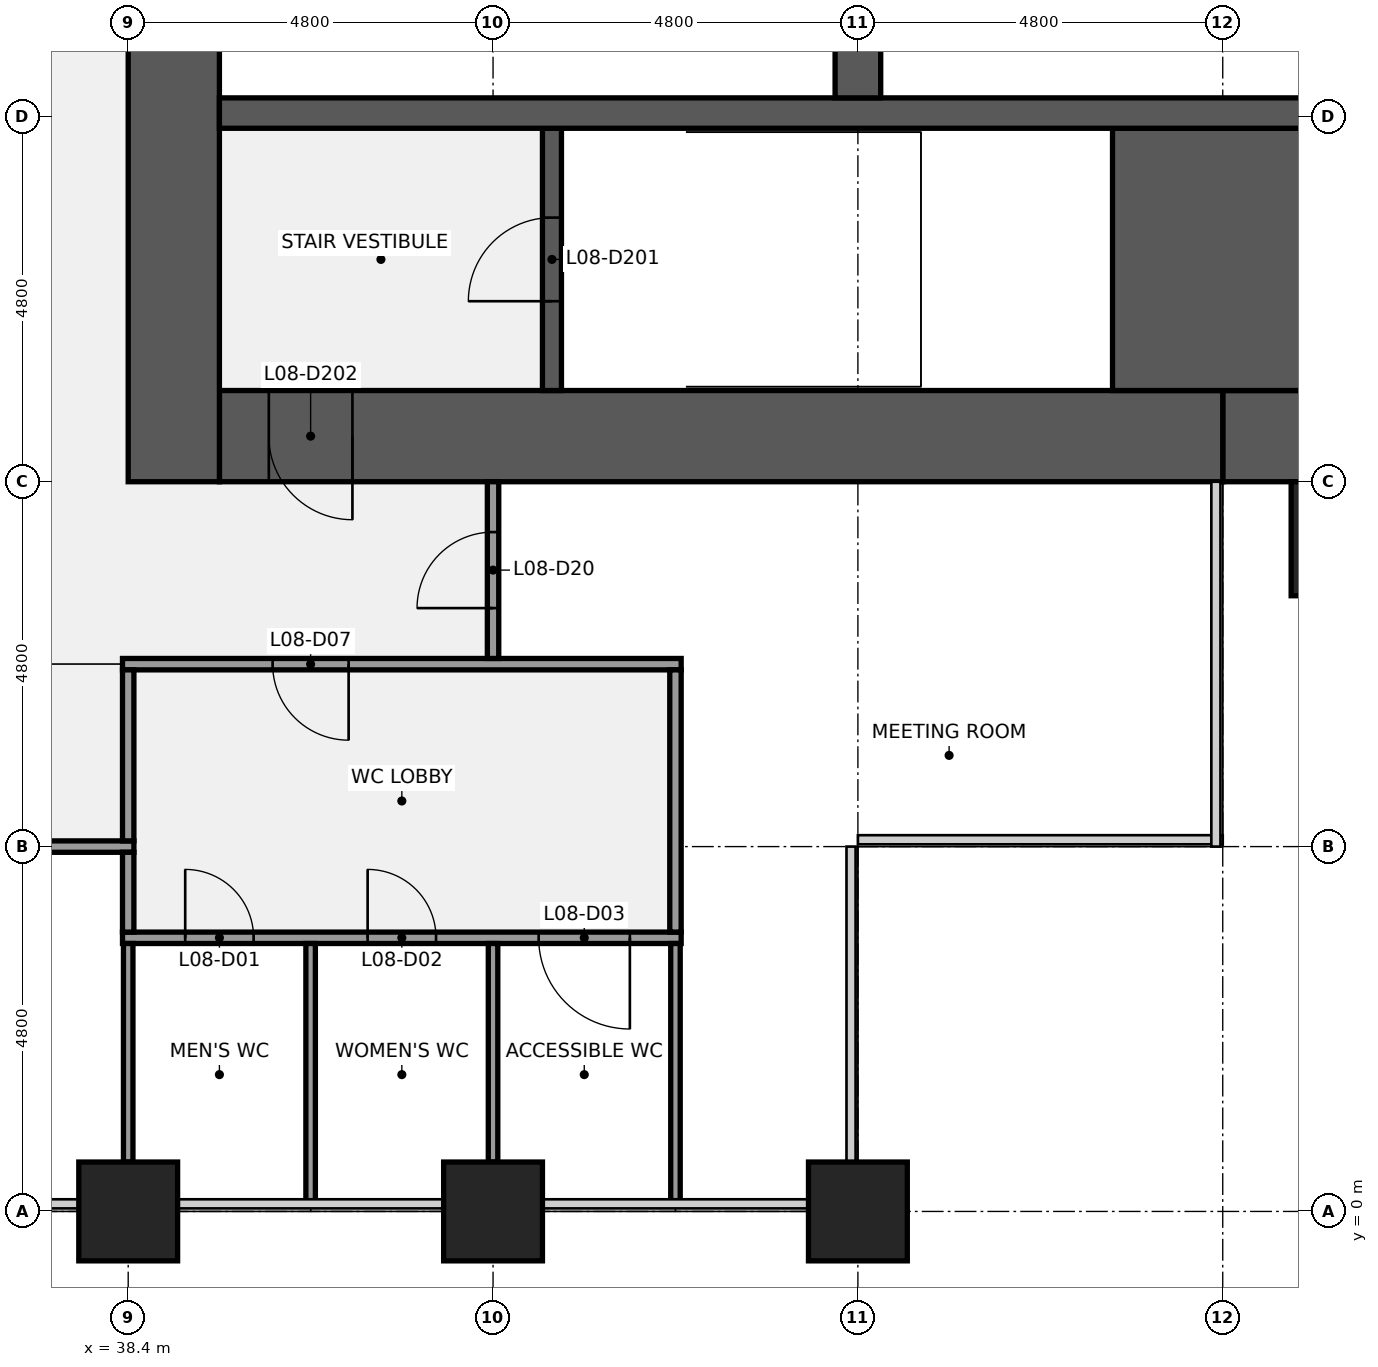
"""IFC4 building model, lengths in metres.
Left out: names, types, materials, properties, quantities, classifications, styles, units other than length and angle.
Written with IfcOpenShell. Run it as: python <this file> out.ifc"""

import sys

from ifc_helpers import new_model, si_unit, direction, frame, frame_2d, origin, origin_2d, place, context, subcontext, project, spatial, rectangle, extrude, element, fill, save


model = new_model("IFC4")
c1 = context("Model", 3, precision=1e-05, world=origin(), true_north=direction((0.0, 1.0)))
c2 = subcontext(c1, "Body", "Model", "MODEL_VIEW")
j1 = project(units=[si_unit("LENGTHUNIT", "METRE"), si_unit("PLANEANGLEUNIT", "RADIAN")], contexts=[c1])
p1 = place(None, origin())
s1 = spatial("IfcSite", under=j1, at=p1, CompositionType="ELEMENT")
p2 = place(p1, origin())
s2 = spatial("IfcBuilding", under=s1, at=p2, CompositionType="ELEMENT")
p3 = place(p2, frame((0.0, 0.0, 43.0)))
s3 = spatial("IfcBuildingStorey", under=s2, at=p3, CompositionType="ELEMENT", Elevation=43.0)
for number, where, z_axis, x_axis in (
    (1, (38.4, 0.0, 0.0), (0.0, 0.0, 1.0), (1.0, 0.0, 0.0)),
    (2, (43.2, 0.0, 0.0), (0.0, 0.0, 1.0), (1.0, 0.0, 0.0)),
    (3, (48.0, 0.0, 0.0), (0.0, 0.0, 1.0), (1.0, 0.0, 0.0)),
):
    element("IfcColumn", number, at=place(p3, frame(where, z_axis=z_axis, x_axis=x_axis)), inside=s3, PredefinedType="COLUMN", context=c2, shape_type="SweptSolid", body=[
        extrude(rectangle(XDim=1.3, YDim=1.3, at=origin_2d()), origin(), (0.0, 0.0, 1.0), 4.0),
    ])
p4 = place(p3, frame((56.4, 10.2, 0.0), z_axis=(0.0, 0.0, 1.0), x_axis=(-1.0, 0.0, 0.0)))
e4 = element("IfcWall", 4, at=p4, inside=s3, PredefinedType="SHEAR", context=c2, shape_type="SweptSolid", body=[
    extrude(rectangle(XDim=3.6, YDim=1.2, at=frame_2d((1.8, 0.0))), origin(), (0.0, 0.0, 1.0), 3.84),
])
p5 = place(p3, frame((52.8, 10.2, 0.0), z_axis=(0.0, 0.0, 1.0), x_axis=(-1.0, 0.0, 0.0)))
e5 = element("IfcWall", 5, at=p5, inside=s3, PredefinedType="SHEAR", context=c2, shape_type="SweptSolid", body=[
    extrude(rectangle(XDim=13.2, YDim=1.2, at=frame_2d((6.6, 0.0))), origin(), (0.0, 0.0, 1.0), 3.84),
])
p6 = place(p5, frame((11.45, 0.0, 0.0)))
e6 = element("IfcOpeningElement", 6, at=p6, cuts=e5, PredefinedType="OPENING", context=c2, shape_type="SweptSolid", body=[
    extrude(rectangle(XDim=1.1, YDim=2.1, at=frame_2d((0.55, 1.05))), frame((0.0, 0.61, 0.0), z_axis=(0.0, -1.0, 0.0), x_axis=(1.0, 0.0, 0.0)), (0.0, 0.0, 1.0), 1.22),
])
p7 = place(p3, frame((39.0, 9.6, 0.0), z_axis=(0.0, 0.0, 1.0), x_axis=(0.0, 1.0, 0.0)))
e7 = element("IfcWall", 7, at=p7, inside=s3, PredefinedType="SHEAR", context=c2, shape_type="SweptSolid", body=[
    extrude(rectangle(XDim=28.8, YDim=1.2, at=frame_2d((14.4, 0.0))), origin(), (0.0, 0.0, 1.0), 3.84),
])
p8 = place(p7, frame((8.7, 0.0, 0.0)))
e8 = element("IfcOpeningElement", 8, at=p8, cuts=e7, PredefinedType="OPENING", context=c2, shape_type="SweptSolid", body=[
    extrude(rectangle(XDim=1.8, YDim=2.1, at=frame_2d((0.9, 1.05))), frame((0.0, 0.61, 0.0), z_axis=(0.0, -1.0, 0.0), x_axis=(1.0, 0.0, 0.0)), (0.0, 0.0, 1.0), 1.22),
])
p9 = place(p7, frame((18.3, 0.0, 0.0)))
e9 = element("IfcOpeningElement", 9, at=p9, cuts=e7, PredefinedType="OPENING", context=c2, shape_type="SweptSolid", body=[
    extrude(rectangle(XDim=1.8, YDim=2.1, at=frame_2d((0.9, 1.05))), frame((0.0, 0.61, 0.0), z_axis=(0.0, -1.0, 0.0), x_axis=(1.0, 0.0, 0.0)), (0.0, 0.0, 1.0), 1.22),
])
p10 = place(p3, frame((51.35, 12.525, 0.0), z_axis=(0.0, 0.0, 1.0), x_axis=(1.0, 0.0, 0.0)))
e10 = element("IfcWall", 10, at=p10, inside=s3, PredefinedType="SHEAR", context=c2, shape_type="SweptSolid", body=[
    extrude(rectangle(XDim=5.05, YDim=3.45, at=frame_2d((2.525, 0.0))), origin(), (0.0, 0.0, 1.0), 3.84),
])
p11 = place(p3, frame((43.975, 10.8, 0.0), z_axis=(0.0, 0.0, 1.0), x_axis=(0.0, 1.0, 0.0)))
e11 = element("IfcWall", 11, at=p11, inside=s3, PredefinedType="SHEAR", context=c2, shape_type="SweptSolid", body=[
    extrude(rectangle(XDim=3.45, YDim=0.25, at=frame_2d((1.725, 0.0))), origin(), (0.0, 0.0, 1.0), 3.84),
])
p12 = place(p11, frame((1.175, 0.0, 0.0)))
e12 = element("IfcOpeningElement", 12, at=p12, cuts=e11, PredefinedType="OPENING", context=c2, shape_type="SweptSolid", body=[
    extrude(rectangle(XDim=1.1, YDim=2.1, at=frame_2d((0.55, 1.05))), frame((0.0, 0.135, 0.0), z_axis=(0.0, -1.0, 0.0), x_axis=(1.0, 0.0, 0.0)), (0.0, 0.0, 1.0), 0.27),
])
p13 = place(p3, frame((39.6, 14.45, 0.0), z_axis=(0.0, 0.0, 1.0), x_axis=(1.0, 0.0, 0.0)))
e13 = element("IfcWall", 13, at=p13, inside=s3, PredefinedType="SHEAR", context=c2, shape_type="SweptSolid", body=[
    extrude(rectangle(XDim=16.8, YDim=0.4, at=frame_2d((8.4, 0.0))), origin(), (0.0, 0.0, 1.0), 3.84),
])
p14 = place(p3, frame((48.0, 14.65, 0.0), z_axis=(0.0, 0.0, 1.0), x_axis=(0.0, 1.0, 0.0)))
e14 = element("IfcWall", 14, at=p14, inside=s3, PredefinedType="SHEAR", context=c2, shape_type="SweptSolid", body=[
    extrude(rectangle(XDim=2.6, YDim=0.6, at=frame_2d((1.3, 0.0))), origin(), (0.0, 0.0, 1.0), 3.84),
])
p15 = place(p3, frame((38.325, 3.6, 0.0), z_axis=(0.0, 0.0, 1.0), x_axis=(1.0, 0.0, 0.0)))
e15 = element("IfcWall", 15, at=p15, inside=s3, PredefinedType="PARTITIONING", context=c2, shape_type="SweptSolid", body=[
    extrude(rectangle(XDim=7.35, YDim=0.15, at=frame_2d((3.675, 0.0))), origin(), (0.0, 0.0, 1.0), 2.849),
])
p16 = place(p15, frame((0.825, 0.0, 0.0)))
e16 = element("IfcOpeningElement", 16, at=p16, cuts=e15, PredefinedType="OPENING", context=c2, shape_type="SweptSolid", body=[
    extrude(rectangle(XDim=0.9, YDim=2.1, at=frame_2d((0.45, 1.05))), frame((0.0, 0.085, 0.0), z_axis=(0.0, -1.0, 0.0), x_axis=(1.0, 0.0, 0.0)), (0.0, 0.0, 1.0), 0.17),
])
p17 = place(p15, frame((3.225, 0.0, 0.0)))
e17 = element("IfcOpeningElement", 17, at=p17, cuts=e15, PredefinedType="OPENING", context=c2, shape_type="SweptSolid", body=[
    extrude(rectangle(XDim=0.9, YDim=2.1, at=frame_2d((0.45, 1.05))), frame((0.0, 0.085, 0.0), z_axis=(0.0, -1.0, 0.0), x_axis=(1.0, 0.0, 0.0)), (0.0, 0.0, 1.0), 0.17),
])
p18 = place(p15, frame((5.475, 0.0, 0.0)))
e18 = element("IfcOpeningElement", 18, at=p18, cuts=e15, PredefinedType="OPENING", context=c2, shape_type="SweptSolid", body=[
    extrude(rectangle(XDim=1.2, YDim=2.1, at=frame_2d((0.6, 1.05))), frame((0.0, 0.085, 0.0), z_axis=(0.0, -1.0, 0.0), x_axis=(1.0, 0.0, 0.0)), (0.0, 0.0, 1.0), 0.17),
])
p19 = place(p3, frame((19.125, 4.8, 0.0), z_axis=(0.0, 0.0, 1.0), x_axis=(1.0, 0.0, 0.0)))
e19 = element("IfcWall", 19, at=p19, inside=s3, PredefinedType="PARTITIONING", context=c2, shape_type="SweptSolid", body=[
    extrude(rectangle(XDim=19.35, YDim=0.15, at=frame_2d((9.675, 0.0))), origin(), (0.0, 0.0, 1.0), 2.849),
])
p20 = place(p19, frame((4.375, 0.0, 0.0)))
e20 = element("IfcOpeningElement", 20, at=p20, cuts=e19, PredefinedType="OPENING", context=c2, shape_type="SweptSolid", body=[
    extrude(rectangle(XDim=1.0, YDim=2.1, at=frame_2d((0.5, 1.05))), frame((0.0, 0.085, 0.0), z_axis=(0.0, -1.0, 0.0), x_axis=(1.0, 0.0, 0.0)), (0.0, 0.0, 1.0), 0.17),
])
p21 = place(p19, frame((13.975, 0.0, 0.0)))
e21 = element("IfcOpeningElement", 21, at=p21, cuts=e19, PredefinedType="OPENING", context=c2, shape_type="SweptSolid", body=[
    extrude(rectangle(XDim=1.0, YDim=2.1, at=frame_2d((0.5, 1.05))), frame((0.0, 0.085, 0.0), z_axis=(0.0, -1.0, 0.0), x_axis=(1.0, 0.0, 0.0)), (0.0, 0.0, 1.0), 0.17),
])
p22 = place(p3, frame((38.325, 7.2, 0.0), z_axis=(0.0, 0.0, 1.0), x_axis=(1.0, 0.0, 0.0)))
e22 = element("IfcWall", 22, at=p22, inside=s3, PredefinedType="PARTITIONING", context=c2, shape_type="SweptSolid", body=[
    extrude(rectangle(XDim=7.35, YDim=0.15, at=frame_2d((3.675, 0.0))), origin(), (0.0, 0.0, 1.0), 2.849),
])
p23 = place(p22, frame((1.975, 0.0, 0.0)))
e23 = element("IfcOpeningElement", 23, at=p23, cuts=e22, PredefinedType="OPENING", context=c2, shape_type="SweptSolid", body=[
    extrude(rectangle(XDim=1.0, YDim=2.1, at=frame_2d((0.5, 1.05))), frame((0.0, 0.085, 0.0), z_axis=(0.0, -1.0, 0.0), x_axis=(1.0, 0.0, 0.0)), (0.0, 0.0, 1.0), 0.17),
])
p24 = place(p3, frame((38.4, 0.65, 0.0), z_axis=(0.0, 0.0, 1.0), x_axis=(0.0, 1.0, 0.0)))
e24 = element("IfcWall", 24, at=p24, inside=s3, PredefinedType="PARTITIONING", context=c2, shape_type="SweptSolid", body=[
    extrude(rectangle(XDim=2.875, YDim=0.125, at=frame_2d((1.438, 0.0))), origin(), (0.0, 0.0, 1.0), 2.849),
])
p25 = place(p3, frame((38.4, 3.675, 0.0), z_axis=(0.0, 0.0, 1.0), x_axis=(0.0, 1.0, 0.0)))
e25 = element("IfcWall", 25, at=p25, inside=s3, PredefinedType="PARTITIONING", context=c2, shape_type="SweptSolid", body=[
    extrude(rectangle(XDim=1.05, YDim=0.15, at=frame_2d((0.525, 0.0))), origin(), (0.0, 0.0, 1.0), 2.849),
])
p26 = place(p3, frame((38.4, 4.875, 0.0), z_axis=(0.0, 0.0, 1.0), x_axis=(0.0, 1.0, 0.0)))
e26 = element("IfcWall", 26, at=p26, inside=s3, PredefinedType="PARTITIONING", context=c2, shape_type="SweptSolid", body=[
    extrude(rectangle(XDim=2.25, YDim=0.15, at=frame_2d((1.125, 0.0))), origin(), (0.0, 0.0, 1.0), 2.849),
])
p27 = place(p3, frame((40.8, 0.1, 0.0), z_axis=(0.0, 0.0, 1.0), x_axis=(0.0, 1.0, 0.0)))
e27 = element("IfcWall", 27, at=p27, inside=s3, PredefinedType="PARTITIONING", context=c2, shape_type="SweptSolid", body=[
    extrude(rectangle(XDim=3.425, YDim=0.125, at=frame_2d((1.712, 0.0))), origin(), (0.0, 0.0, 1.0), 2.849),
])
p28 = place(p3, frame((43.2, 0.65, 0.0), z_axis=(0.0, 0.0, 1.0), x_axis=(0.0, 1.0, 0.0)))
e28 = element("IfcWall", 28, at=p28, inside=s3, PredefinedType="PARTITIONING", context=c2, shape_type="SweptSolid", body=[
    extrude(rectangle(XDim=2.875, YDim=0.125, at=frame_2d((1.438, 0.0))), origin(), (0.0, 0.0, 1.0), 2.849),
])
p29 = place(p3, frame((43.2, 7.275, 0.0), z_axis=(0.0, 0.0, 1.0), x_axis=(0.0, 1.0, 0.0)))
e29 = element("IfcWall", 29, at=p29, inside=s3, PredefinedType="PARTITIONING", context=c2, shape_type="SweptSolid", body=[
    extrude(rectangle(XDim=2.325, YDim=0.15, at=frame_2d((1.163, 0.0))), origin(), (0.0, 0.0, 1.0), 2.849),
])
p30 = place(p29, frame((0.663, 0.0, 0.0)))
e30 = element("IfcOpeningElement", 30, at=p30, cuts=e29, PredefinedType="OPENING", context=c2, shape_type="SweptSolid", body=[
    extrude(rectangle(XDim=1.0, YDim=2.1, at=frame_2d((0.5, 1.05))), frame((0.0, 0.085, 0.0), z_axis=(0.0, -1.0, 0.0), x_axis=(1.0, 0.0, 0.0)), (0.0, 0.0, 1.0), 0.17),
])
p31 = place(p3, frame((45.6, 0.1, 0.0), z_axis=(0.0, 0.0, 1.0), x_axis=(0.0, 1.0, 0.0)))
e31 = element("IfcWall", 31, at=p31, inside=s3, PredefinedType="PARTITIONING", context=c2, shape_type="SweptSolid", body=[
    extrude(rectangle(XDim=3.425, YDim=0.125, at=frame_2d((1.712, 0.0))), origin(), (0.0, 0.0, 1.0), 2.849),
])
p32 = place(p3, frame((45.6, 3.675, 0.0), z_axis=(0.0, 0.0, 1.0), x_axis=(0.0, 1.0, 0.0)))
e32 = element("IfcWall", 32, at=p32, inside=s3, PredefinedType="PARTITIONING", context=c2, shape_type="SweptSolid", body=[
    extrude(rectangle(XDim=3.45, YDim=0.15, at=frame_2d((1.725, 0.0))), origin(), (0.0, 0.0, 1.0), 2.849),
])
p33 = place(p3, frame((55.2, 8.85, 0.0), z_axis=(0.0, 0.0, 1.0), x_axis=(1.0, 0.0, 0.0)))
e33 = element("IfcColumn", 33, at=p33, inside=s3, PredefinedType="PILASTER", context=c2, shape_type="SweptSolid", body=[
    extrude(rectangle(XDim=3.0, YDim=1.5, at=origin_2d()), origin(), (0.0, 0.0, 1.0), 4.0),
])
for number, where, z_axis, x_axis in (
    (34, (38.4, -1.075, 0.0), (0.0, 0.0, 1.0), (1.0, 0.0, 0.0)),
    (35, (43.2, -1.075, 0.0), (0.0, 0.0, 1.0), (1.0, 0.0, 0.0)),
    (36, (48.0, -1.075, 0.0), (0.0, 0.0, 1.0), (1.0, 0.0, 0.0)),
):
    element("IfcColumn", number, at=place(p3, frame(where, z_axis=z_axis, x_axis=x_axis)), inside=s3, PredefinedType="PILASTER", context=c2, shape_type="SweptSolid", body=[
        extrude(rectangle(XDim=4.2, YDim=0.85, at=origin_2d()), origin(), (0.0, 0.0, 1.0), 4.0),
    ])
p34 = place(p12, origin())
e37 = element("IfcDoor", 37, at=p34, inside=s3, OperationType="SINGLE_SWING_LEFT", PredefinedType="DOOR", context=c2, shape_type="SweptSolid", body=[
    extrude(rectangle(XDim=1.1, YDim=2.1, at=frame_2d((0.55, 1.05))), frame((0.0, 0.025, 0.0), z_axis=(0.0, -1.0, 0.0), x_axis=(1.0, 0.0, 0.0)), (0.0, 0.0, 1.0), 0.05),
])
fill(e12, e37)
p35 = place(p6, origin())
e38 = element("IfcDoor", 38, at=p35, inside=s3, OperationType="SINGLE_SWING_LEFT", PredefinedType="DOOR", context=c2, shape_type="SweptSolid", body=[
    extrude(rectangle(XDim=1.1, YDim=2.1, at=frame_2d((0.55, 1.05))), frame((0.0, 0.025, 0.0), z_axis=(0.0, -1.0, 0.0), x_axis=(1.0, 0.0, 0.0)), (0.0, 0.0, 1.0), 0.05),
])
fill(e6, e38)
p36 = place(p16, origin())
e39 = element("IfcDoor", 39, at=p36, inside=s3, OperationType="SINGLE_SWING_LEFT", PredefinedType="DOOR", context=c2, shape_type="SweptSolid", body=[
    extrude(rectangle(XDim=0.9, YDim=2.1, at=frame_2d((0.45, 1.05))), frame((0.0, 0.025, 0.0), z_axis=(0.0, -1.0, 0.0), x_axis=(1.0, 0.0, 0.0)), (0.0, 0.0, 1.0), 0.05),
])
fill(e16, e39)
p37 = place(p17, origin())
e40 = element("IfcDoor", 40, at=p37, inside=s3, OperationType="SINGLE_SWING_LEFT", PredefinedType="DOOR", context=c2, shape_type="SweptSolid", body=[
    extrude(rectangle(XDim=0.9, YDim=2.1, at=frame_2d((0.45, 1.05))), frame((0.0, 0.025, 0.0), z_axis=(0.0, -1.0, 0.0), x_axis=(1.0, 0.0, 0.0)), (0.0, 0.0, 1.0), 0.05),
])
fill(e17, e40)
p38 = place(p18, origin())
e41 = element("IfcDoor", 41, at=p38, inside=s3, OperationType="SINGLE_SWING_RIGHT", PredefinedType="DOOR", context=c2, shape_type="SweptSolid", body=[
    extrude(rectangle(XDim=1.2, YDim=2.1, at=frame_2d((0.6, 1.05))), frame((0.0, 0.025, 0.0), z_axis=(0.0, -1.0, 0.0), x_axis=(1.0, 0.0, 0.0)), (0.0, 0.0, 1.0), 0.05),
])
fill(e18, e41)
p39 = place(p23, origin())
e42 = element("IfcDoor", 42, at=p39, inside=s3, OperationType="SINGLE_SWING_RIGHT", PredefinedType="DOOR", context=c2, shape_type="SweptSolid", body=[
    extrude(rectangle(XDim=1.0, YDim=2.1, at=frame_2d((0.5, 1.05))), frame((0.0, 0.025, 0.0), z_axis=(0.0, -1.0, 0.0), x_axis=(1.0, 0.0, 0.0)), (0.0, 0.0, 1.0), 0.05),
])
fill(e23, e42)
p40 = place(p30, origin())
e43 = element("IfcDoor", 43, at=p40, inside=s3, OperationType="SINGLE_SWING_LEFT", PredefinedType="DOOR", context=c2, shape_type="SweptSolid", body=[
    extrude(rectangle(XDim=1.0, YDim=2.1, at=frame_2d((0.5, 1.05))), frame((0.0, 0.025, 0.0), z_axis=(0.0, -1.0, 0.0), x_axis=(1.0, 0.0, 0.0)), (0.0, 0.0, 1.0), 0.05),
])
fill(e30, e43)
save(model, sys.argv[1])
